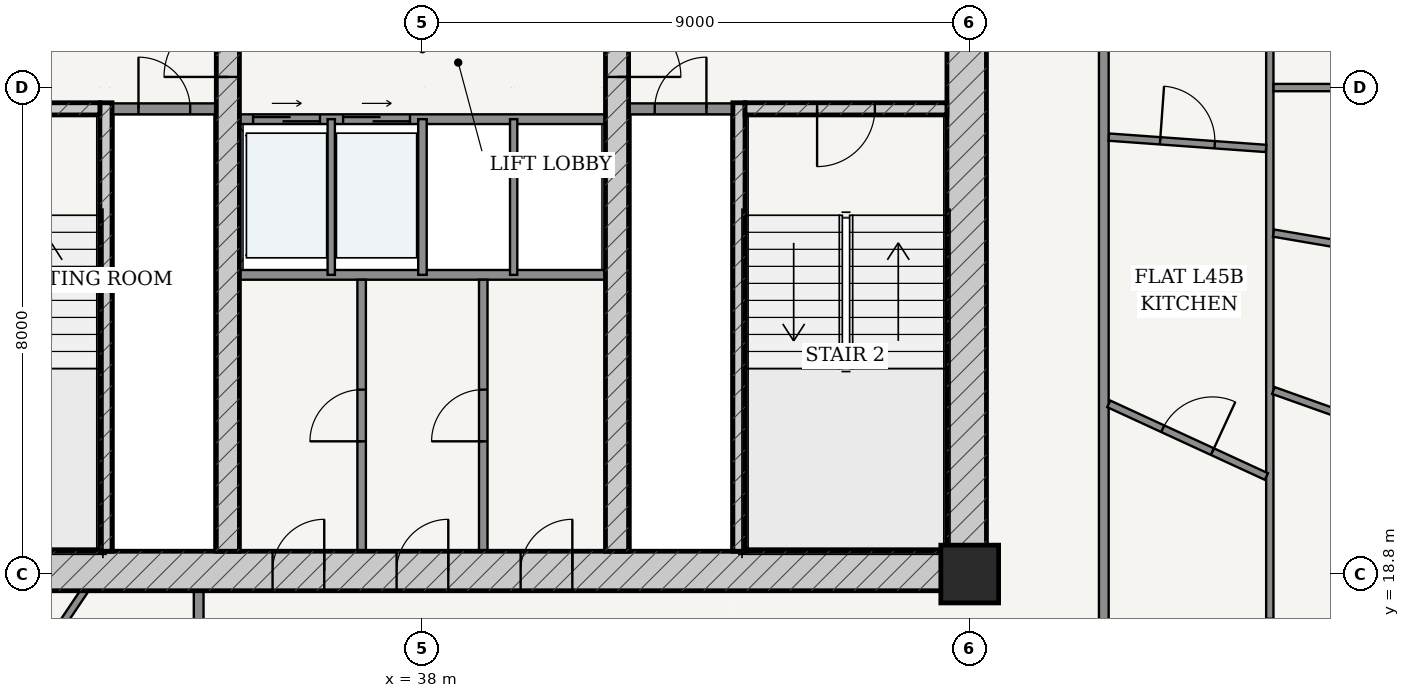
"""IFC4 building model, lengths in metres.
Left out: names, types, materials, properties, quantities, classifications, styles, units other than length and angle.
Written with IfcOpenShell. Run it as: python <this file> out.ifc"""

import sys

from ifc_helpers import new_model, si_unit, direction, frame, frame_2d, origin, origin_2d, place, context, subcontext, project, spatial, rectangle, extrude, source, transform, mapped, element, fill, save


model = new_model("IFC4")
c1 = context("Model", 3, precision=1e-05, world=origin(), true_north=direction((-0.2419218956, 0.970295726276)))
c2 = subcontext(c1, "Body", "Model", "MODEL_VIEW")
j1 = project(units=[si_unit("LENGTHUNIT", "METRE"), si_unit("PLANEANGLEUNIT", "RADIAN")], contexts=[c1])
p1 = place(None, origin())
s1 = spatial("IfcSite", under=j1, at=p1, CompositionType="ELEMENT")
p2 = place(p1, origin())
s2 = spatial("IfcBuilding", under=s1, at=p2, CompositionType="ELEMENT")
p3 = place(p2, frame((0.0, 0.0, 171.4)))
s3 = spatial("IfcBuildingStorey", under=s2, at=p3, CompositionType="ELEMENT", Elevation=171.4)
p4 = place(p3, frame((47.0, 18.8, 0.0), z_axis=(0.0, 0.0, 1.0), x_axis=(1.0, 0.0, 0.0)))
e1 = element("IfcColumn", 1, at=p4, inside=s3, PredefinedType="COLUMN", context=c2, shape_type="SweptSolid", body=[
    extrude(rectangle(XDim=0.95, YDim=0.95, at=origin_2d()), origin(), (0.0, 0.0, 1.0), 3.6),
])
p5 = place(p3, frame((28.725, 18.85, 0.0), z_axis=(0.0, 0.0, 1.0), x_axis=(1.0, 0.0, 0.0)))
e2 = element("IfcWall", 2, at=p5, inside=s3, PredefinedType="SHEAR", context=c2, shape_type="SweptSolid", body=[
    extrude(rectangle(XDim=18.55, YDim=0.65, at=frame_2d((9.275, 0.0))), origin(), (0.0, 0.0, 1.0), 3.33),
])
p6 = place(p5, frame((6.81, 0.0, 0.0)))
e3 = element("IfcOpeningElement", 3, at=p6, cuts=e2, PredefinedType="OPENING", context=c2, shape_type="SweptSolid", body=[
    extrude(rectangle(XDim=0.85, YDim=2.1, at=frame_2d((0.425, 1.05))), frame((0.0, 0.335, 0.0), z_axis=(0.0, -1.0, 0.0), x_axis=(1.0, 0.0, 0.0)), (0.0, 0.0, 1.0), 0.67),
])
p7 = place(p5, frame((8.85, 0.0, 0.0)))
e4 = element("IfcOpeningElement", 4, at=p7, cuts=e2, PredefinedType="OPENING", context=c2, shape_type="SweptSolid", body=[
    extrude(rectangle(XDim=0.85, YDim=2.1, at=frame_2d((0.425, 1.05))), frame((0.0, 0.335, 0.0), z_axis=(0.0, -1.0, 0.0), x_axis=(1.0, 0.0, 0.0)), (0.0, 0.0, 1.0), 0.67),
])
p8 = place(p5, frame((10.89, 0.0, 0.0)))
e5 = element("IfcOpeningElement", 5, at=p8, cuts=e2, PredefinedType="OPENING", context=c2, shape_type="SweptSolid", body=[
    extrude(rectangle(XDim=0.85, YDim=2.1, at=frame_2d((0.425, 1.05))), frame((0.0, 0.335, 0.0), z_axis=(0.0, -1.0, 0.0), x_axis=(1.0, 0.0, 0.0)), (0.0, 0.0, 1.0), 0.67),
])
p9 = place(p3, frame((46.95, 19.175, 0.0), z_axis=(0.0, 0.0, 1.0), x_axis=(0.0, 1.0, 0.0)))
e6 = element("IfcWall", 6, at=p9, inside=s3, PredefinedType="SHEAR", context=c2, shape_type="SweptSolid", body=[
    extrude(rectangle(XDim=15.25, YDim=0.65, at=frame_2d((7.625, 0.0))), origin(), (0.0, 0.0, 1.0), 3.33),
])
p10 = place(p9, frame((9.875, 0.0, 0.0)))
e7 = element("IfcOpeningElement", 7, at=p10, cuts=e6, PredefinedType="OPENING", context=c2, shape_type="SweptSolid", body=[
    extrude(rectangle(XDim=1.5, YDim=2.2, at=frame_2d((0.75, 1.1))), frame((0.0, 0.335, 0.0), z_axis=(0.0, -1.0, 0.0), x_axis=(1.0, 0.0, 0.0)), (0.0, 0.0, 1.0), 0.67),
])
p11 = place(p3, frame((32.795, 19.175, 0.0), z_axis=(0.0, 0.0, 1.0), x_axis=(0.0, 1.0, 0.0)))
e8 = element("IfcWall", 8, at=p11, inside=s3, PredefinedType="SOLIDWALL", context=c2, shape_type="SweptSolid", body=[
    extrude(rectangle(XDim=7.375, YDim=0.2, at=frame_2d((3.688, 0.0))), origin(), (0.0, 0.0, 1.0), 3.33),
])
p12 = place(p3, frame((29.375, 26.45, 0.0), z_axis=(0.0, 0.0, 1.0), x_axis=(1.0, 0.0, 0.0)))
e9 = element("IfcWall", 9, at=p12, inside=s3, PredefinedType="SOLIDWALL", context=c2, shape_type="SweptSolid", body=[
    extrude(rectangle(XDim=3.32, YDim=0.2, at=frame_2d((1.66, 0.0))), origin(), (0.0, 0.0, 1.0), 3.33),
])
p13 = place(p12, frame((1.185, 0.0, 0.0)))
e10 = element("IfcOpeningElement", 10, at=p13, cuts=e9, PredefinedType="OPENING", context=c2, shape_type="SweptSolid", body=[
    extrude(rectangle(XDim=0.95, YDim=2.15, at=frame_2d((0.475, 1.075))), frame((0.0, 0.11, 0.0), z_axis=(0.0, -1.0, 0.0), x_axis=(1.0, 0.0, 0.0)), (0.0, 0.0, 1.0), 0.22),
])
p14 = place(p3, frame((43.205, 19.175, 0.0), z_axis=(0.0, 0.0, 1.0), x_axis=(0.0, 1.0, 0.0)))
e11 = element("IfcWall", 11, at=p14, inside=s3, PredefinedType="SOLIDWALL", context=c2, shape_type="SweptSolid", body=[
    extrude(rectangle(XDim=7.375, YDim=0.2, at=frame_2d((3.688, 0.0))), origin(), (0.0, 0.0, 1.0), 3.33),
])
p15 = place(p3, frame((43.305, 26.45, 0.0), z_axis=(0.0, 0.0, 1.0), x_axis=(1.0, 0.0, 0.0)))
e12 = element("IfcWall", 12, at=p15, inside=s3, PredefinedType="SOLIDWALL", context=c2, shape_type="SweptSolid", body=[
    extrude(rectangle(XDim=3.32, YDim=0.2, at=frame_2d((1.66, 0.0))), origin(), (0.0, 0.0, 1.0), 3.33),
])
p16 = place(p15, frame((1.185, 0.0, 0.0)))
e13 = element("IfcOpeningElement", 13, at=p16, cuts=e12, PredefinedType="OPENING", context=c2, shape_type="SweptSolid", body=[
    extrude(rectangle(XDim=0.95, YDim=2.15, at=frame_2d((0.475, 1.075))), frame((0.0, 0.11, 0.0), z_axis=(0.0, -1.0, 0.0), x_axis=(1.0, 0.0, 0.0)), (0.0, 0.0, 1.0), 0.22),
])
p17 = place(p3, frame((34.8, 19.175, 0.0), z_axis=(0.0, 0.0, 1.0), x_axis=(0.0, 1.0, 0.0)))
e14 = element("IfcWall", 14, at=p17, inside=s3, PredefinedType="SHEAR", context=c2, shape_type="SweptSolid", body=[
    extrude(rectangle(XDim=15.25, YDim=0.38, at=frame_2d((7.625, 0.0))), origin(), (0.0, 0.0, 1.0), 3.33),
])
p18 = place(p17, frame((7.8, 0.0, 0.0)))
e15 = element("IfcOpeningElement", 15, at=p18, cuts=e14, PredefinedType="OPENING", context=c2, shape_type="SweptSolid", body=[
    extrude(rectangle(XDim=1.05, YDim=2.15, at=frame_2d((0.525, 1.075))), frame((0.0, 0.2, 0.0), z_axis=(0.0, -1.0, 0.0), x_axis=(1.0, 0.0, 0.0)), (0.0, 0.0, 1.0), 0.4),
])
p19 = place(p3, frame((41.2, 19.175, 0.0), z_axis=(0.0, 0.0, 1.0), x_axis=(0.0, 1.0, 0.0)))
e16 = element("IfcWall", 16, at=p19, inside=s3, PredefinedType="SHEAR", context=c2, shape_type="SweptSolid", body=[
    extrude(rectangle(XDim=15.25, YDim=0.38, at=frame_2d((7.625, 0.0))), origin(), (0.0, 0.0, 1.0), 3.33),
])
p20 = place(p19, frame((7.8, 0.0, 0.0)))
e17 = element("IfcOpeningElement", 17, at=p20, cuts=e16, PredefinedType="OPENING", context=c2, shape_type="SweptSolid", body=[
    extrude(rectangle(XDim=1.05, YDim=2.15, at=frame_2d((0.525, 1.075))), frame((0.0, 0.2, 0.0), z_axis=(0.0, -1.0, 0.0), x_axis=(1.0, 0.0, 0.0)), (0.0, 0.0, 1.0), 0.4),
])
p21 = place(p3, frame((32.9, 26.45, 0.0), z_axis=(0.0, 0.0, 1.0), x_axis=(1.0, 0.0, 0.0)))
e18 = element("IfcWall", 18, at=p21, inside=s3, PredefinedType="PARTITIONING", context=c2, shape_type="SweptSolid", body=[
    extrude(rectangle(XDim=1.71, YDim=0.18, at=frame_2d((0.855, 0.0))), origin(), (0.0, 0.0, 1.0), 3.33),
])
p22 = place(p21, frame((0.43, 0.0, 0.0)))
e19 = element("IfcOpeningElement", 19, at=p22, cuts=e18, PredefinedType="OPENING", context=c2, shape_type="SweptSolid", body=[
    extrude(rectangle(XDim=0.85, YDim=2.1, at=frame_2d((0.425, 1.05))), frame((0.0, 0.1, 0.0), z_axis=(0.0, -1.0, 0.0), x_axis=(1.0, 0.0, 0.0)), (0.0, 0.0, 1.0), 0.2),
])
p23 = place(p3, frame((41.39, 26.45, 0.0), z_axis=(0.0, 0.0, 1.0), x_axis=(1.0, 0.0, 0.0)))
e20 = element("IfcWall", 20, at=p23, inside=s3, PredefinedType="PARTITIONING", context=c2, shape_type="SweptSolid", body=[
    extrude(rectangle(XDim=1.71, YDim=0.18, at=frame_2d((0.855, 0.0))), origin(), (0.0, 0.0, 1.0), 3.33),
])
p24 = place(p23, frame((0.43, 0.0, 0.0)))
e21 = element("IfcOpeningElement", 21, at=p24, cuts=e20, PredefinedType="OPENING", context=c2, shape_type="SweptSolid", body=[
    extrude(rectangle(XDim=0.85, YDim=2.1, at=frame_2d((0.425, 1.05))), frame((0.0, 0.1, 0.0), z_axis=(0.0, -1.0, 0.0), x_axis=(1.0, 0.0, 0.0)), (0.0, 0.0, 1.0), 0.2),
])
p25 = place(p3, frame((34.99, 26.28, 0.0), z_axis=(0.0, 0.0, 1.0), x_axis=(1.0, 0.0, 0.0)))
e22 = element("IfcWall", 22, at=p25, inside=s3, PredefinedType="PARTITIONING", context=c2, shape_type="SweptSolid", body=[
    extrude(rectangle(XDim=6.02, YDim=0.16, at=frame_2d((3.01, 0.0))), origin(), (0.0, 0.0, 1.0), 3.33),
])
p26 = place(p25, frame((0.225, 0.0, 0.0)))
e23 = element("IfcOpeningElement", 23, at=p26, cuts=e22, PredefinedType="OPENING", context=c2, shape_type="SweptSolid", body=[
    extrude(rectangle(XDim=1.1, YDim=2.2, at=frame_2d((0.55, 1.1))), frame((0.0, 0.09, 0.0), z_axis=(0.0, -1.0, 0.0), x_axis=(1.0, 0.0, 0.0)), (0.0, 0.0, 1.0), 0.18),
])
p27 = place(p25, frame((1.705, 0.0, 0.0)))
e24 = element("IfcOpeningElement", 24, at=p27, cuts=e22, PredefinedType="OPENING", context=c2, shape_type="SweptSolid", body=[
    extrude(rectangle(XDim=1.1, YDim=2.2, at=frame_2d((0.55, 1.1))), frame((0.0, 0.09, 0.0), z_axis=(0.0, -1.0, 0.0), x_axis=(1.0, 0.0, 0.0)), (0.0, 0.0, 1.0), 0.18),
])
p28 = place(p3, frame((34.99, 23.72, 0.0), z_axis=(0.0, 0.0, 1.0), x_axis=(1.0, 0.0, 0.0)))
e25 = element("IfcWall", 25, at=p28, inside=s3, PredefinedType="PARTITIONING", context=c2, shape_type="SweptSolid", body=[
    extrude(rectangle(XDim=6.02, YDim=0.16, at=frame_2d((3.01, 0.0))), origin(), (0.0, 0.0, 1.0), 3.33),
])
p29 = place(p3, frame((36.5, 23.72, 0.0), z_axis=(0.0, 0.0, 1.0), x_axis=(0.0, 1.0, 0.0)))
e26 = element("IfcWall", 26, at=p29, inside=s3, PredefinedType="PARTITIONING", context=c2, shape_type="SweptSolid", body=[
    extrude(rectangle(XDim=2.56, YDim=0.12, at=frame_2d((1.28, 0.0))), origin(), (0.0, 0.0, 1.0), 3.33),
])
p30 = place(p3, frame((38.0, 23.72, 0.0), z_axis=(0.0, 0.0, 1.0), x_axis=(0.0, 1.0, 0.0)))
e27 = element("IfcWall", 27, at=p30, inside=s3, PredefinedType="PARTITIONING", context=c2, shape_type="SweptSolid", body=[
    extrude(rectangle(XDim=2.56, YDim=0.14, at=frame_2d((1.28, 0.0))), origin(), (0.0, 0.0, 1.0), 3.33),
])
p31 = place(p3, frame((39.5, 23.72, 0.0), z_axis=(0.0, 0.0, 1.0), x_axis=(0.0, 1.0, 0.0)))
e28 = element("IfcWall", 28, at=p31, inside=s3, PredefinedType="PARTITIONING", context=c2, shape_type="SweptSolid", body=[
    extrude(rectangle(XDim=2.56, YDim=0.12, at=frame_2d((1.28, 0.0))), origin(), (0.0, 0.0, 1.0), 3.33),
])
p32 = place(p3, frame((37.0, 19.175, 0.0), z_axis=(0.0, 0.0, 1.0), x_axis=(0.0, 1.0, 0.0)))
e29 = element("IfcWall", 29, at=p32, inside=s3, PredefinedType="PARTITIONING", context=c2, shape_type="SweptSolid", body=[
    extrude(rectangle(XDim=4.465, YDim=0.14, at=frame_2d((2.232, 0.0))), origin(), (0.0, 0.0, 1.0), 3.33),
])
p33 = place(p32, frame((1.808, 0.0, 0.0)))
e30 = element("IfcOpeningElement", 30, at=p33, cuts=e29, PredefinedType="OPENING", context=c2, shape_type="SweptSolid", body=[
    extrude(rectangle(XDim=0.85, YDim=2.1, at=frame_2d((0.425, 1.05))), frame((0.0, 0.08, 0.0), z_axis=(0.0, -1.0, 0.0), x_axis=(1.0, 0.0, 0.0)), (0.0, 0.0, 1.0), 0.16),
])
p34 = place(p3, frame((39.0, 19.175, 0.0), z_axis=(0.0, 0.0, 1.0), x_axis=(0.0, 1.0, 0.0)))
e31 = element("IfcWall", 31, at=p34, inside=s3, PredefinedType="PARTITIONING", context=c2, shape_type="SweptSolid", body=[
    extrude(rectangle(XDim=4.465, YDim=0.14, at=frame_2d((2.232, 0.0))), origin(), (0.0, 0.0, 1.0), 3.33),
])
p35 = place(p34, frame((1.808, 0.0, 0.0)))
e32 = element("IfcOpeningElement", 32, at=p35, cuts=e31, PredefinedType="OPENING", context=c2, shape_type="SweptSolid", body=[
    extrude(rectangle(XDim=0.85, YDim=2.1, at=frame_2d((0.425, 1.05))), frame((0.0, 0.08, 0.0), z_axis=(0.0, -1.0, 0.0), x_axis=(1.0, 0.0, 0.0)), (0.0, 0.0, 1.0), 0.16),
])
p36 = place(p3, frame((34.32, 16.675, 0.0), z_axis=(0.0, 0.0, 1.0), x_axis=(0.0, 1.0, 0.0)))
e33 = element("IfcWall", 33, at=p36, inside=s3, PredefinedType="PARTITIONING", context=c2, shape_type="SweptSolid", body=[
    extrude(rectangle(XDim=1.85, YDim=0.16, at=frame_2d((0.925, 0.0))), origin(), (0.0, 0.0, 1.0), 3.33),
])
p37 = place(p3, frame((49.205, 16.675, 0.0), z_axis=(0.0, 0.0, 1.0), x_axis=(0.0, 1.0, 0.0)))
e34 = element("IfcWall", 34, at=p37, inside=s3, PredefinedType="PARTITIONING", context=c2, shape_type="SweptSolid", body=[
    extrude(rectangle(XDim=18.4, YDim=0.16, at=frame_2d((9.2, 0.0))), origin(), (0.0, 0.0, 1.0), 2.776),
])
p38 = place(p3, frame((32.441, 18.525, 0.0), z_axis=(0.0, 0.0, 1.0), x_axis=(-0.557594690071, -0.830113342625, 0.0)))
e35 = element("IfcWall", 35, at=p38, inside=s3, PredefinedType="PARTITIONING", context=c2, shape_type="SweptSolid", body=[
    extrude(rectangle(XDim=3.13, YDim=0.12, at=frame_2d((1.565, 0.0))), origin(), (0.0, 0.0, 1.0), 3.33),
])
p39 = place(p38, frame((1.135, 0.0, 0.0)))
e36 = element("IfcOpeningElement", 36, at=p39, cuts=e35, PredefinedType="OPENING", context=c2, shape_type="SweptSolid", body=[
    extrude(rectangle(XDim=0.86, YDim=2.15, at=frame_2d((0.43, 1.075))), frame((0.0, 0.07, 0.0), z_axis=(0.0, -1.0, 0.0), x_axis=(1.0, 0.0, 0.0)), (0.0, 0.0, 1.0), 0.14),
])
p40 = place(p3, frame((51.935, 37.885, 0.0), z_axis=(0.0, 0.0, 1.0), x_axis=(0.0, -1.0, 0.0)))
e37 = element("IfcWall", 37, at=p40, inside=s3, PredefinedType="PARTITIONING", context=c2, shape_type="SweptSolid", body=[
    extrude(rectangle(XDim=24.02, YDim=0.12, at=frame_2d((12.01, 0.0))), origin(), (0.0, 0.0, 1.0), 2.776),
])
p41 = place(p40, frame((19.821, 0.0, 0.0)))
e38 = element("IfcOpeningElement", 38, at=p41, cuts=e37, PredefinedType="OPENING", context=c2, shape_type="SweptSolid", body=[
    extrude(rectangle(XDim=0.9, YDim=2.15, at=frame_2d((0.45, 1.075))), frame((0.0, 0.07, 0.0), z_axis=(0.0, -1.0, 0.0), x_axis=(1.0, 0.0, 0.0)), (0.0, 0.0, 1.0), 0.14),
])
p42 = place(p3, frame((51.993, 21.818, 0.0), z_axis=(0.0, 0.0, 1.0), x_axis=(0.942077868165, -0.335394231187, 0.0)))
e39 = element("IfcWall", 39, at=p42, inside=s3, PredefinedType="PARTITIONING", context=c2, shape_type="SweptSolid", body=[
    extrude(rectangle(XDim=8.817, YDim=0.12, at=frame_2d((4.408, 0.0))), origin(), (0.0, 0.0, 1.0), 2.846),
])
p43 = place(p42, frame((3.958, 0.0, 0.0)))
e40 = element("IfcOpeningElement", 40, at=p43, cuts=e39, PredefinedType="OPENING", context=c2, shape_type="SweptSolid", body=[
    extrude(rectangle(XDim=0.9, YDim=2.15, at=frame_2d((0.45, 1.075))), frame((0.0, 0.07, 0.0), z_axis=(0.0, -1.0, 0.0), x_axis=(1.0, 0.0, 0.0)), (0.0, 0.0, 1.0), 0.14),
])
p44 = place(p3, frame((51.996, 24.407, 0.0), z_axis=(0.0, 0.0, 1.0), x_axis=(0.985698378271, -0.168519159369, 0.0)))
e41 = element("IfcWall", 41, at=p44, inside=s3, PredefinedType="PARTITIONING", context=c2, shape_type="SweptSolid", body=[
    extrude(rectangle(XDim=9.769, YDim=0.12, at=frame_2d((4.884, 0.0))), origin(), (0.0, 0.0, 1.0), 2.776),
])
p45 = place(p44, frame((3.428, 0.0, 0.0)))
e42 = element("IfcOpeningElement", 42, at=p45, cuts=e41, PredefinedType="OPENING", context=c2, shape_type="SweptSolid", body=[
    extrude(rectangle(XDim=0.9, YDim=2.15, at=frame_2d((0.45, 1.075))), frame((0.0, 0.07, 0.0), z_axis=(0.0, -1.0, 0.0), x_axis=(1.0, 0.0, 0.0)), (0.0, 0.0, 1.0), 0.14),
])
p46 = place(p3, frame((51.997, 26.8, 0.0), z_axis=(0.0, 0.0, 1.0), x_axis=(1.0, 0.0, 0.0)))
e43 = element("IfcWall", 43, at=p46, inside=s3, PredefinedType="PARTITIONING", context=c2, shape_type="SweptSolid", body=[
    extrude(rectangle(XDim=10.143, YDim=0.12, at=frame_2d((5.071, 0.0))), origin(), (0.0, 0.0, 1.0), 2.846),
])
p47 = place(p46, frame((4.622, 0.0, 0.0)))
e44 = element("IfcOpeningElement", 44, at=p47, cuts=e43, PredefinedType="OPENING", context=c2, shape_type="SweptSolid", body=[
    extrude(rectangle(XDim=0.9, YDim=2.15, at=frame_2d((0.45, 1.075))), frame((0.0, 0.07, 0.0), z_axis=(0.0, -1.0, 0.0), x_axis=(1.0, 0.0, 0.0)), (0.0, 0.0, 1.0), 0.14),
])
p48 = place(p3, frame((49.287, 21.598, 0.0), z_axis=(0.0, 0.0, 1.0), x_axis=(0.908177096136, -0.418586146514, 0.0)))
e45 = element("IfcWall", 45, at=p48, inside=s3, PredefinedType="PARTITIONING", context=c2, shape_type="SweptSolid", body=[
    extrude(rectangle(XDim=2.854, YDim=0.12, at=frame_2d((1.427, 0.0))), origin(), (0.0, 0.0, 1.0), 3.33),
])
p49 = place(p48, frame((0.977, 0.0, 0.0)))
e46 = element("IfcOpeningElement", 46, at=p49, cuts=e45, PredefinedType="OPENING", context=c2, shape_type="SweptSolid", body=[
    extrude(rectangle(XDim=0.9, YDim=2.15, at=frame_2d((0.45, 1.075))), frame((0.0, 0.07, 0.0), z_axis=(0.0, -1.0, 0.0), x_axis=(1.0, 0.0, 0.0)), (0.0, 0.0, 1.0), 0.14),
])
p50 = place(p3, frame((49.287, 25.985, 0.0), z_axis=(0.0, 0.0, 1.0), x_axis=(0.997408744903, -0.07194300237, 0.0)))
e47 = element("IfcWall", 47, at=p50, inside=s3, PredefinedType="PARTITIONING", context=c2, shape_type="SweptSolid", body=[
    extrude(rectangle(XDim=2.593, YDim=0.12, at=frame_2d((1.296, 0.0))), origin(), (0.0, 0.0, 1.0), 3.33),
])
p51 = place(p50, frame((0.846, 0.0, 0.0)))
e48 = element("IfcOpeningElement", 48, at=p51, cuts=e47, PredefinedType="OPENING", context=c2, shape_type="SweptSolid", body=[
    extrude(rectangle(XDim=0.9, YDim=2.15, at=frame_2d((0.45, 1.075))), frame((0.0, 0.07, 0.0), z_axis=(0.0, -1.0, 0.0), x_axis=(1.0, 0.0, 0.0)), (0.0, 0.0, 1.0), 0.14),
])
m1 = source(origin(), c2, "Body", "SweptSolid", [
    extrude(rectangle(XDim=1.05, YDim=2.15, at=frame_2d((0.525, 1.075))), frame((0.0, 0.025, 0.0), z_axis=(0.0, -1.0, 0.0), x_axis=(1.0, 0.0, 0.0)), (0.0, 0.0, 1.0), 0.05),
])
p52 = place(p18, origin())
e49 = element("IfcDoor", 49, at=p52, inside=s3, OperationType="SINGLE_SWING_LEFT", PredefinedType="DOOR", context=c2, shape_type="MappedRepresentation", body=[
    mapped(m1, transform((0.0, 0.0, 0.0), scale=1.0)),
])
fill(e15, e49)
p53 = place(p20, frame((1.05, 0.0, 0.0), z_axis=(0.0, 0.0, 1.0), x_axis=(-1.0, 0.0, 0.0)))
e50 = element("IfcDoor", 50, at=p53, inside=s3, OperationType="SINGLE_SWING_RIGHT", PredefinedType="DOOR", context=c2, shape_type="MappedRepresentation", body=[
    mapped(m1, transform((0.0, 0.0, 0.0), scale=1.0)),
])
fill(e17, e50)
m2 = source(origin(), c2, "Body", "SweptSolid", [
    extrude(rectangle(XDim=0.95, YDim=2.15, at=frame_2d((0.475, 1.075))), frame((0.0, 0.025, 0.0), z_axis=(0.0, -1.0, 0.0), x_axis=(1.0, 0.0, 0.0)), (0.0, 0.0, 1.0), 0.05),
])
p54 = place(p16, frame((0.95, 0.0, 0.0), z_axis=(0.0, 0.0, 1.0), x_axis=(-1.0, 0.0, 0.0)))
e51 = element("IfcDoor", 51, at=p54, inside=s3, OperationType="SINGLE_SWING_RIGHT", PredefinedType="DOOR", context=c2, shape_type="MappedRepresentation", body=[
    mapped(m2, transform((0.0, 0.0, 0.0), scale=1.0)),
])
fill(e13, e51)
m3 = source(origin(), c2, "Body", "SweptSolid", [
    extrude(rectangle(XDim=0.85, YDim=2.1, at=frame_2d((0.425, 1.05))), frame((0.0, 0.025, 0.0), z_axis=(0.0, -1.0, 0.0), x_axis=(1.0, 0.0, 0.0)), (0.0, 0.0, 1.0), 0.05),
])
p55 = place(p22, origin())
e52 = element("IfcDoor", 52, at=p55, inside=s3, OperationType="SINGLE_SWING_LEFT", PredefinedType="DOOR", context=c2, shape_type="MappedRepresentation", body=[
    mapped(m3, transform((0.0, 0.0, 0.0), scale=1.0)),
])
fill(e19, e52)
p56 = place(p24, origin())
e53 = element("IfcDoor", 53, at=p56, inside=s3, OperationType="SINGLE_SWING_RIGHT", PredefinedType="DOOR", context=c2, shape_type="MappedRepresentation", body=[
    mapped(m3, transform((0.0, 0.0, 0.0), scale=1.0)),
])
fill(e21, e53)
p57 = place(p6, origin())
e54 = element("IfcDoor", 54, at=p57, inside=s3, OperationType="SINGLE_SWING_RIGHT", PredefinedType="DOOR", context=c2, shape_type="MappedRepresentation", body=[
    mapped(m3, transform((0.0, 0.0, 0.0), scale=1.0)),
])
fill(e3, e54)
p58 = place(p7, origin())
e55 = element("IfcDoor", 55, at=p58, inside=s3, OperationType="SINGLE_SWING_RIGHT", PredefinedType="DOOR", context=c2, shape_type="MappedRepresentation", body=[
    mapped(m3, transform((0.0, 0.0, 0.0), scale=1.0)),
])
fill(e4, e55)
p59 = place(p8, origin())
e56 = element("IfcDoor", 56, at=p59, inside=s3, OperationType="SINGLE_SWING_RIGHT", PredefinedType="DOOR", context=c2, shape_type="MappedRepresentation", body=[
    mapped(m3, transform((0.0, 0.0, 0.0), scale=1.0)),
])
fill(e5, e56)
p60 = place(p33, origin())
e57 = element("IfcDoor", 57, at=p60, inside=s3, OperationType="SINGLE_SWING_LEFT", PredefinedType="DOOR", context=c2, shape_type="MappedRepresentation", body=[
    mapped(m3, transform((0.0, 0.0, 0.0), scale=1.0)),
])
fill(e30, e57)
p61 = place(p35, origin())
e58 = element("IfcDoor", 58, at=p61, inside=s3, OperationType="SINGLE_SWING_LEFT", PredefinedType="DOOR", context=c2, shape_type="MappedRepresentation", body=[
    mapped(m3, transform((0.0, 0.0, 0.0), scale=1.0)),
])
fill(e32, e58)
m4 = source(origin(), c2, "Body", "SweptSolid", [
    extrude(rectangle(XDim=1.1, YDim=2.2, at=frame_2d((0.55, 1.1))), frame((0.0, 0.025, 0.0), z_axis=(0.0, -1.0, 0.0), x_axis=(1.0, 0.0, 0.0)), (0.0, 0.0, 1.0), 0.05),
])
p62 = place(p26, origin())
e59 = element("IfcDoor", 59, at=p62, inside=s3, OperationType="DOUBLE_DOOR_SLIDING", PredefinedType="DOOR", context=c2, shape_type="MappedRepresentation", body=[
    mapped(m4, transform((0.0, 0.0, 0.0), scale=1.0)),
])
fill(e23, e59)
p63 = place(p27, origin())
e60 = element("IfcDoor", 60, at=p63, inside=s3, OperationType="DOUBLE_DOOR_SLIDING", PredefinedType="DOOR", context=c2, shape_type="MappedRepresentation", body=[
    mapped(m4, transform((0.0, 0.0, 0.0), scale=1.0)),
])
fill(e24, e60)
m5 = source(origin(), c2, "Body", "SweptSolid", [
    extrude(rectangle(XDim=0.9, YDim=2.15, at=frame_2d((0.45, 1.075))), frame((0.0, 0.025, 0.0), z_axis=(0.0, -1.0, 0.0), x_axis=(1.0, 0.0, 0.0)), (0.0, 0.0, 1.0), 0.05),
])
p64 = place(p49, origin())
e61 = element("IfcDoor", 61, at=p64, inside=s3, OperationType="SINGLE_SWING_RIGHT", PredefinedType="DOOR", context=c2, shape_type="MappedRepresentation", body=[
    mapped(m5, transform((0.0, 0.0, 0.0), scale=1.0)),
])
fill(e46, e61)
p65 = place(p51, origin())
e62 = element("IfcDoor", 62, at=p65, inside=s3, OperationType="SINGLE_SWING_LEFT", PredefinedType="DOOR", context=c2, shape_type="MappedRepresentation", body=[
    mapped(m5, transform((0.0, 0.0, 0.0), scale=1.0)),
])
fill(e48, e62)
save(model, sys.argv[1])
